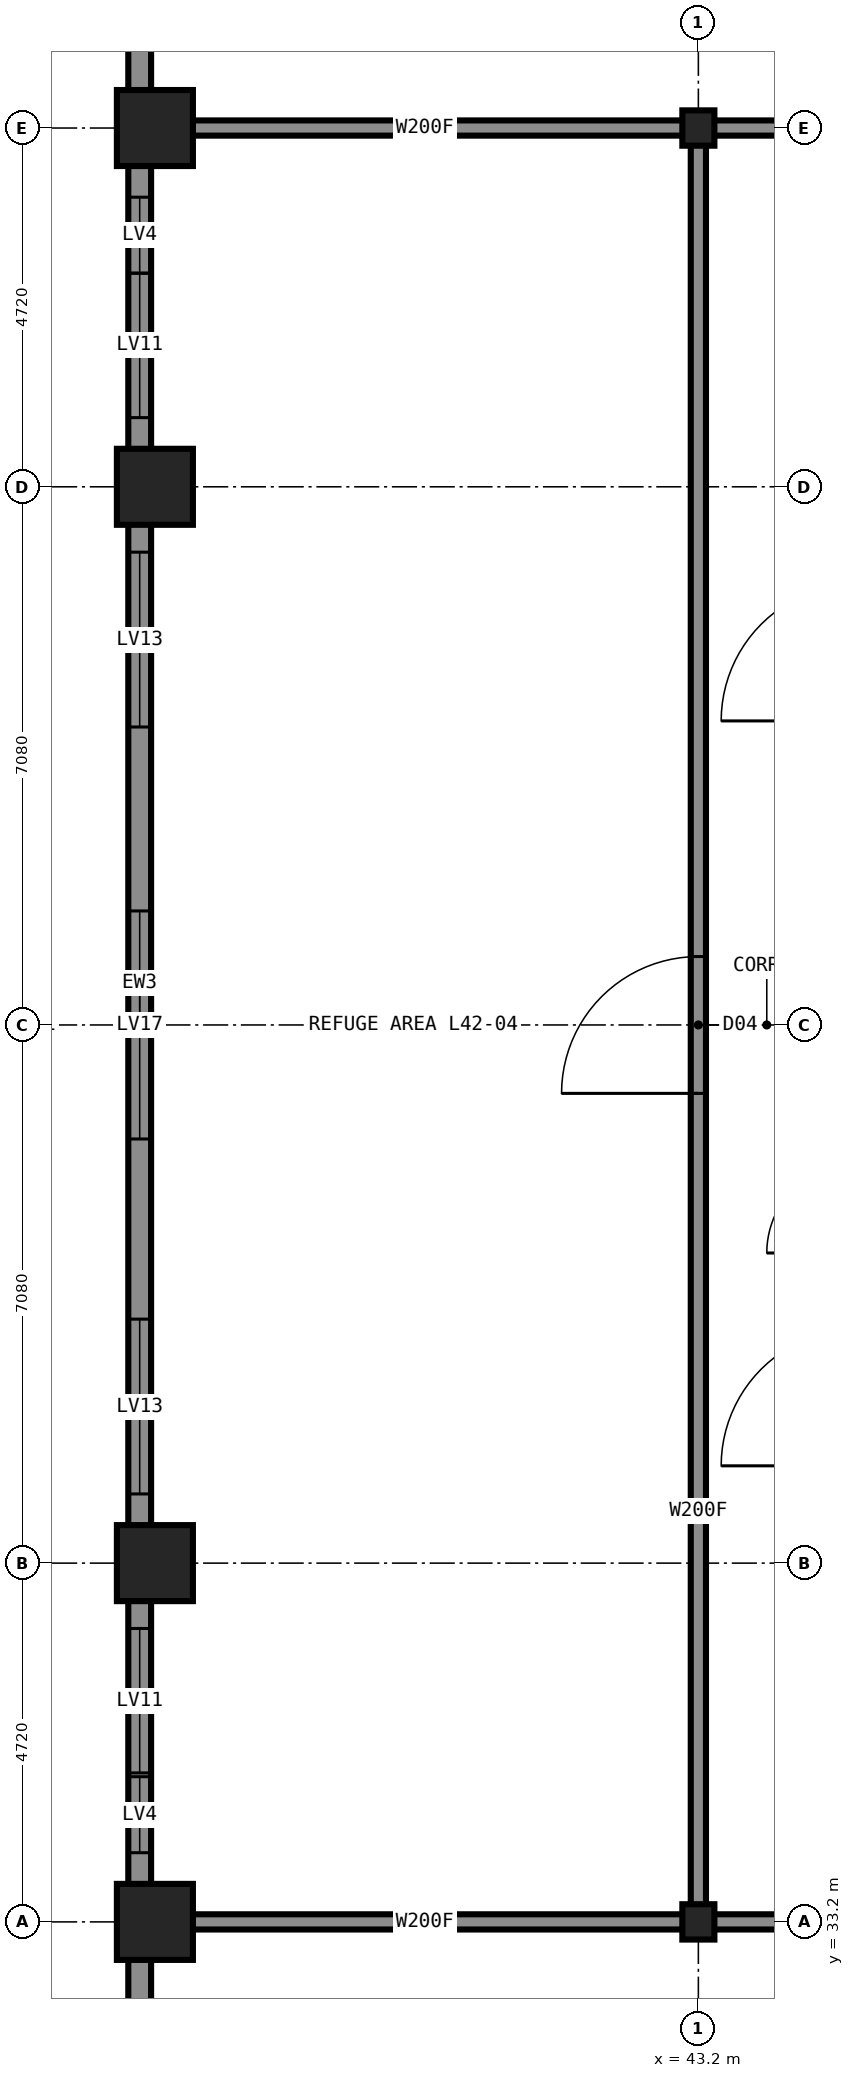
"""IFC4 building model, lengths in metres.
Left out: names, types, materials, properties, quantities, classifications, styles, units other than length and angle.
Written with IfcOpenShell. Run it as: python <this file> out.ifc"""

import sys

from ifc_helpers import new_model, si_unit, direction, frame, frame_2d, origin, origin_2d, place, context, subcontext, project, spatial, rectangle, hollow_rectangle, i_section, extrude, element, fill, save


model = new_model("IFC4")
c1 = context("Model", 3, precision=1e-05, world=origin(), true_north=direction((0.0, 1.0)))
c2 = subcontext(c1, "Body", "Model", "MODEL_VIEW")
j1 = project(units=[si_unit("LENGTHUNIT", "METRE"), si_unit("PLANEANGLEUNIT", "RADIAN")], contexts=[c1])
p1 = place(None, origin())
s1 = spatial("IfcSite", under=j1, at=p1, CompositionType="ELEMENT")
p2 = place(p1, origin())
s2 = spatial("IfcBuilding", under=s1, at=p2, CompositionType="ELEMENT")
p3 = place(p2, frame((0.0, 0.0, 156.4)))
s3 = spatial("IfcBuildingStorey", under=s2, at=p3, CompositionType="ELEMENT", Elevation=156.4)
for number, where, z_axis, x_axis in (
    (1, (36.05, 33.2, 0.0), (0.0, 0.0, 1.0), (1.0, 0.0, 0.0)),
    (2, (36.05, 37.92, 0.0), (0.0, 0.0, 1.0), (1.0, 0.0, 0.0)),
    (3, (36.05, 52.08, 0.0), (0.0, 0.0, 1.0), (1.0, 0.0, 0.0)),
    (4, (36.05, 56.8, 0.0), (0.0, 0.0, 1.0), (1.0, 0.0, 0.0)),
):
    element("IfcColumn", number, at=place(p3, frame(where, z_axis=z_axis, x_axis=x_axis)), inside=s3, PredefinedType="COLUMN", context=c2, shape_type="SweptSolid", body=[
        extrude(hollow_rectangle(XDim=1.0, YDim=1.0, WallThickness=0.06, at=origin_2d()), origin(), (0.0, 0.0, 1.0), 5.4),
    ])
for number, where, z_axis, x_axis in (
    (5, (43.2, 33.2, 0.0), (0.0, 0.0, 1.0), (1.0, 0.0, 0.0)),
    (6, (43.2, 56.8, 0.0), (0.0, 0.0, 1.0), (1.0, 0.0, 0.0)),
):
    element("IfcColumn", number, at=place(p3, frame(where, z_axis=z_axis, x_axis=x_axis)), inside=s3, PredefinedType="COLUMN", context=c2, shape_type="SweptSolid", body=[
        extrude(i_section(OverallWidth=0.422, OverallDepth=0.465, WebThickness=0.045, FlangeThickness=0.073, at=origin_2d()), origin(), (0.0, 0.0, 1.0), 5.4),
    ])
p4 = place(p3, frame((43.2, 33.2, 0.0), z_axis=(0.0, 0.0, 1.0), x_axis=(1.0, 0.0, 0.0)))
e7 = element("IfcWall", 7, at=p4, inside=s3, PredefinedType="PARTITIONING", context=c2, shape_type="SweptSolid", body=[
    extrude(rectangle(XDim=23.6, YDim=0.2, at=frame_2d((11.8, 0.0))), origin(), (0.0, 0.0, 1.0), 5.23),
])
p5 = place(p4, frame((5.3, 0.0, 0.0)))
e8 = element("IfcOpeningElement", 8, at=p5, cuts=e7, PredefinedType="OPENING", context=c2, shape_type="SweptSolid", body=[
    extrude(rectangle(XDim=1.0, YDim=2.1, at=frame_2d((0.5, 1.05))), frame((0.0, 0.11, 0.0), z_axis=(0.0, -1.0, 0.0), x_axis=(1.0, 0.0, 0.0)), (0.0, 0.0, 1.0), 0.22),
])
p6 = place(p3, frame((36.0, 33.2, 0.0), z_axis=(0.0, 0.0, 1.0), x_axis=(1.0, 0.0, 0.0)))
e9 = element("IfcWall", 9, at=p6, inside=s3, PredefinedType="PARTITIONING", context=c2, shape_type="SweptSolid", body=[
    extrude(rectangle(XDim=7.2, YDim=0.2, at=frame_2d((3.6, 0.0))), origin(), (0.0, 0.0, 1.0), 4.473),
])
p7 = place(p3, frame((43.2, 56.8, 0.0), z_axis=(0.0, 0.0, 1.0), x_axis=(1.0, 0.0, 0.0)))
e10 = element("IfcWall", 10, at=p7, inside=s3, PredefinedType="PARTITIONING", context=c2, shape_type="SweptSolid", body=[
    extrude(rectangle(XDim=23.6, YDim=0.2, at=frame_2d((11.8, 0.0))), origin(), (0.0, 0.0, 1.0), 5.23),
])
p8 = place(p7, frame((5.3, 0.0, 0.0)))
e11 = element("IfcOpeningElement", 11, at=p8, cuts=e10, PredefinedType="OPENING", context=c2, shape_type="SweptSolid", body=[
    extrude(rectangle(XDim=1.0, YDim=2.1, at=frame_2d((0.5, 1.05))), frame((0.0, 0.11, 0.0), z_axis=(0.0, -1.0, 0.0), x_axis=(1.0, 0.0, 0.0)), (0.0, 0.0, 1.0), 0.22),
])
p9 = place(p3, frame((36.0, 56.8, 0.0), z_axis=(0.0, 0.0, 1.0), x_axis=(1.0, 0.0, 0.0)))
e12 = element("IfcWall", 12, at=p9, inside=s3, PredefinedType="PARTITIONING", context=c2, shape_type="SweptSolid", body=[
    extrude(rectangle(XDim=7.2, YDim=0.2, at=frame_2d((3.6, 0.0))), origin(), (0.0, 0.0, 1.0), 4.473),
])
p10 = place(p3, frame((43.2, 33.2, 0.0), z_axis=(0.0, 0.0, 1.0), x_axis=(0.0, 1.0, 0.0)))
e13 = element("IfcWall", 13, at=p10, inside=s3, PredefinedType="PARTITIONING", context=c2, shape_type="SweptSolid", body=[
    extrude(rectangle(XDim=23.6, YDim=0.2, at=frame_2d((11.8, 0.0))), origin(), (0.0, 0.0, 1.0), 5.23),
])
p11 = place(p10, frame((10.9, 0.0, 0.0)))
e14 = element("IfcOpeningElement", 14, at=p11, cuts=e13, PredefinedType="OPENING", context=c2, shape_type="SweptSolid", body=[
    extrude(rectangle(XDim=1.8, YDim=2.2, at=frame_2d((0.9, 1.1))), frame((0.0, 0.11, 0.0), z_axis=(0.0, -1.0, 0.0), x_axis=(1.0, 0.0, 0.0)), (0.0, 0.0, 1.0), 0.22),
])
p12 = place(p3, frame((35.85, 58.8, 0.0), z_axis=(0.0, 0.0, 1.0), x_axis=(0.0, -1.0, 0.0)))
e15 = element("IfcWall", 15, at=p12, inside=s3, PredefinedType="SOLIDWALL", context=c2, shape_type="SweptSolid", body=[
    extrude(rectangle(XDim=27.6, YDim=0.3, at=frame_2d((13.8, 0.0))), origin(), (0.0, 0.0, 1.0), 4.43),
])
p13 = place(p12, frame((3.91, 0.0, 2.2)))
e16 = element("IfcOpeningElement", 16, at=p13, cuts=e15, PredefinedType="OPENING", context=c2, shape_type="SweptSolid", body=[
    extrude(rectangle(XDim=1.9, YDim=1.6, at=frame_2d((0.95, 0.8))), frame((0.0, 0.16, 0.0), z_axis=(0.0, -1.0, 0.0), x_axis=(1.0, 0.0, 0.0)), (0.0, 0.0, 1.0), 0.32),
])
p14 = place(p12, frame((7.58, 0.0, 2.15)))
e17 = element("IfcOpeningElement", 17, at=p14, cuts=e15, PredefinedType="OPENING", context=c2, shape_type="SweptSolid", body=[
    extrude(rectangle(XDim=2.3, YDim=1.6, at=frame_2d((1.15, 0.8))), frame((0.0, 0.16, 0.0), z_axis=(0.0, -1.0, 0.0), x_axis=(1.0, 0.0, 0.0)), (0.0, 0.0, 1.0), 0.32),
])
p15 = place(p12, frame((12.3, 0.0, 0.6)))
e18 = element("IfcOpeningElement", 18, at=p15, cuts=e15, PredefinedType="OPENING", context=c2, shape_type="SweptSolid", body=[
    extrude(rectangle(XDim=3.0, YDim=2.1, at=frame_2d((1.5, 1.05))), frame((0.0, 0.16, 0.0), z_axis=(0.0, -1.0, 0.0), x_axis=(1.0, 0.0, 0.0)), (0.0, 0.0, 1.0), 0.32),
])
p16 = place(p12, frame((17.67, 0.0, 2.15)))
e19 = element("IfcOpeningElement", 19, at=p16, cuts=e15, PredefinedType="OPENING", context=c2, shape_type="SweptSolid", body=[
    extrude(rectangle(XDim=2.3, YDim=1.6, at=frame_2d((1.15, 0.8))), frame((0.0, 0.16, 0.0), z_axis=(0.0, -1.0, 0.0), x_axis=(1.0, 0.0, 0.0)), (0.0, 0.0, 1.0), 0.32),
])
p17 = place(p12, frame((21.74, 0.0, 2.2)))
e20 = element("IfcOpeningElement", 20, at=p17, cuts=e15, PredefinedType="OPENING", context=c2, shape_type="SweptSolid", body=[
    extrude(rectangle(XDim=1.9, YDim=1.6, at=frame_2d((0.95, 0.8))), frame((0.0, 0.16, 0.0), z_axis=(0.0, -1.0, 0.0), x_axis=(1.0, 0.0, 0.0)), (0.0, 0.0, 1.0), 0.32),
])
p18 = place(p12, frame((2.91, 0.0, 2.95)))
e21 = element("IfcOpeningElement", 21, at=p18, cuts=e15, PredefinedType="OPENING", context=c2, shape_type="SweptSolid", body=[
    extrude(rectangle(XDim=1.0, YDim=0.8, at=frame_2d((0.5, 0.4))), frame((0.0, 0.16, 0.0), z_axis=(0.0, -1.0, 0.0), x_axis=(1.0, 0.0, 0.0)), (0.0, 0.0, 1.0), 0.32),
])
p19 = place(p12, frame((23.69, 0.0, 2.95)))
e22 = element("IfcOpeningElement", 22, at=p19, cuts=e15, PredefinedType="OPENING", context=c2, shape_type="SweptSolid", body=[
    extrude(rectangle(XDim=1.0, YDim=0.8, at=frame_2d((0.5, 0.4))), frame((0.0, 0.16, 0.0), z_axis=(0.0, -1.0, 0.0), x_axis=(1.0, 0.0, 0.0)), (0.0, 0.0, 1.0), 0.32),
])
p20 = place(p11, origin())
e23 = element("IfcDoor", 23, at=p20, inside=s3, OperationType="DOUBLE_DOOR_SINGLE_SWING", PredefinedType="DOOR", context=c2, shape_type="SweptSolid", body=[
    extrude(rectangle(XDim=1.8, YDim=2.2, at=frame_2d((0.9, 1.1))), frame((0.0, 0.025, 0.0), z_axis=(0.0, -1.0, 0.0), x_axis=(1.0, 0.0, 0.0)), (0.0, 0.0, 1.0), 0.05),
])
fill(e14, e23)
p21 = place(p13, origin())
e24 = element("IfcWindow", 24, at=p21, inside=s3, PartitioningType="SINGLE_PANEL", PredefinedType="USERDEFINED", context=c2, shape_type="SweptSolid", body=[
    extrude(rectangle(XDim=1.9, YDim=1.6, at=frame_2d((0.95, 0.8))), frame((0.0, 0.03, 0.0), z_axis=(0.0, -1.0, 0.0), x_axis=(1.0, 0.0, 0.0)), (0.0, 0.0, 1.0), 0.06),
])
fill(e16, e24)
p22 = place(p14, origin())
e25 = element("IfcWindow", 25, at=p22, inside=s3, PartitioningType="SINGLE_PANEL", PredefinedType="USERDEFINED", context=c2, shape_type="SweptSolid", body=[
    extrude(rectangle(XDim=2.3, YDim=1.6, at=frame_2d((1.15, 0.8))), frame((0.0, 0.03, 0.0), z_axis=(0.0, -1.0, 0.0), x_axis=(1.0, 0.0, 0.0)), (0.0, 0.0, 1.0), 0.06),
])
fill(e17, e25)
p23 = place(p15, origin())
e26 = element("IfcWindow", 26, at=p23, inside=s3, PartitioningType="SINGLE_PANEL", PredefinedType="USERDEFINED", context=c2, shape_type="SweptSolid", body=[
    extrude(rectangle(XDim=3.0, YDim=2.1, at=frame_2d((1.5, 1.05))), frame((0.0, 0.03, 0.0), z_axis=(0.0, -1.0, 0.0), x_axis=(1.0, 0.0, 0.0)), (0.0, 0.0, 1.0), 0.06),
])
fill(e18, e26)
p24 = place(p16, origin())
e27 = element("IfcWindow", 27, at=p24, inside=s3, PartitioningType="SINGLE_PANEL", PredefinedType="USERDEFINED", context=c2, shape_type="SweptSolid", body=[
    extrude(rectangle(XDim=2.3, YDim=1.6, at=frame_2d((1.15, 0.8))), frame((0.0, 0.03, 0.0), z_axis=(0.0, -1.0, 0.0), x_axis=(1.0, 0.0, 0.0)), (0.0, 0.0, 1.0), 0.06),
])
fill(e19, e27)
p25 = place(p17, origin())
e28 = element("IfcWindow", 28, at=p25, inside=s3, PartitioningType="SINGLE_PANEL", PredefinedType="USERDEFINED", context=c2, shape_type="SweptSolid", body=[
    extrude(rectangle(XDim=1.9, YDim=1.6, at=frame_2d((0.95, 0.8))), frame((0.0, 0.03, 0.0), z_axis=(0.0, -1.0, 0.0), x_axis=(1.0, 0.0, 0.0)), (0.0, 0.0, 1.0), 0.06),
])
fill(e20, e28)
p26 = place(p18, origin())
e29 = element("IfcWindow", 29, at=p26, inside=s3, PartitioningType="SINGLE_PANEL", PredefinedType="USERDEFINED", context=c2, shape_type="SweptSolid", body=[
    extrude(rectangle(XDim=1.0, YDim=0.8, at=frame_2d((0.5, 0.4))), frame((0.0, 0.03, 0.0), z_axis=(0.0, -1.0, 0.0), x_axis=(1.0, 0.0, 0.0)), (0.0, 0.0, 1.0), 0.06),
])
fill(e21, e29)
p27 = place(p19, origin())
e30 = element("IfcWindow", 30, at=p27, inside=s3, PartitioningType="SINGLE_PANEL", PredefinedType="USERDEFINED", context=c2, shape_type="SweptSolid", body=[
    extrude(rectangle(XDim=1.0, YDim=0.8, at=frame_2d((0.5, 0.4))), frame((0.0, 0.03, 0.0), z_axis=(0.0, -1.0, 0.0), x_axis=(1.0, 0.0, 0.0)), (0.0, 0.0, 1.0), 0.06),
])
fill(e22, e30)
save(model, sys.argv[1])
